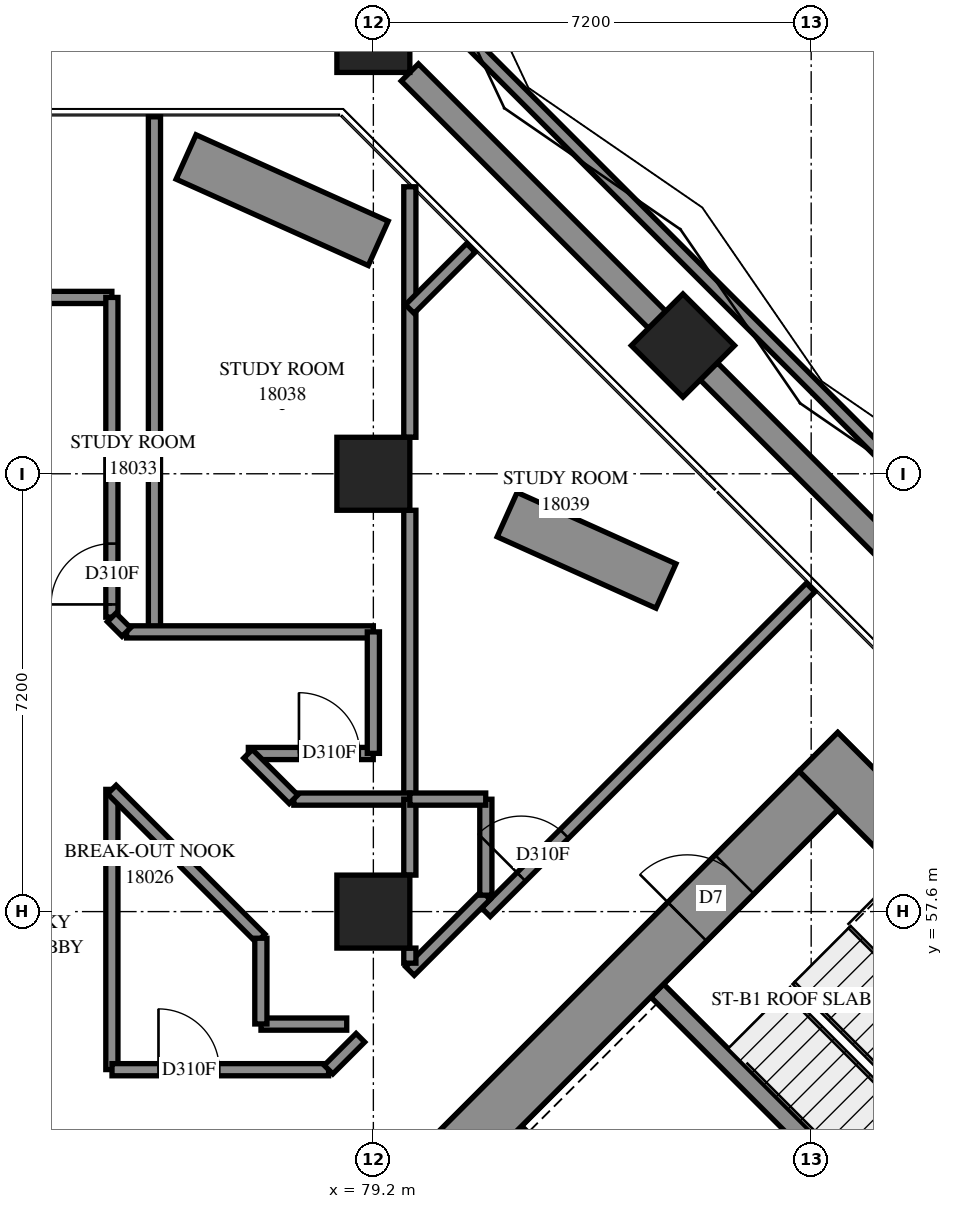
"""IFC4 building model, lengths in metres.
Left out: names, types, materials, properties, quantities, classifications, styles, units other than length and angle.
Written with IfcOpenShell. Run it as: python <this file> out.ifc"""

import sys

from ifc_helpers import new_model, si_unit, direction, frame, frame_2d, origin, origin_2d, place, context, subcontext, project, spatial, polyline, rectangle, outline, extrude, element, fill, save


model = new_model("IFC4")
c1 = context("Model", 3, precision=1e-05, world=origin(), true_north=direction((0.0, 1.0)))
c2 = subcontext(c1, "Body", "Model", "MODEL_VIEW")
j1 = project(units=[si_unit("LENGTHUNIT", "METRE"), si_unit("PLANEANGLEUNIT", "RADIAN")], contexts=[c1])
p1 = place(None, origin())
s1 = spatial("IfcSite", under=j1, at=p1, CompositionType="ELEMENT")
p2 = place(p1, origin())
s2 = spatial("IfcBuilding", under=s1, at=p2, CompositionType="ELEMENT")
p3 = place(p2, frame((0.0, 0.0, 67.8)))
s3 = spatial("IfcBuildingStorey", under=s2, at=p3, CompositionType="ELEMENT", Elevation=67.8)
for number, where, z_axis, x_axis in (
    (1, (79.2, 57.6, 0.0), (0.0, 0.0, 1.0), (1.0, 0.0, 0.0)),
    (2, (79.2, 64.8, 0.0), (0.0, 0.0, 1.0), (1.0, 0.0, 0.0)),
    (3, (79.2, 72.0, 0.0), (0.0, 0.0, 1.0), (1.0, 0.0, 0.0)),
    (4, (84.291, 66.909, 0.0), (0.0, 0.0, 1.0), (0.707, -0.707, 0.0)),
):
    element("IfcColumn", number, at=place(p3, frame(where, z_axis=z_axis, x_axis=x_axis)), inside=s3, PredefinedType="COLUMN", context=c2, shape_type="SweptSolid", body=[
        extrude(rectangle(XDim=1.2, YDim=1.2, at=origin_2d()), origin(), (0.0, 0.0, 1.0), 3.9),
    ])
p4 = place(p3, frame((86.519, 60.227, -0.3), z_axis=(0.0, 0.0, 1.0), x_axis=(0.7071036948, -0.7071098676, 0.0)))
e5 = element("IfcWall", 5, at=p4, inside=s3, PredefinedType="SHEAR", context=c2, shape_type="SweptSolid", body=[
    extrude(rectangle(XDim=16.2, YDim=0.9, at=frame_2d((8.1, 0.0))), origin(), (0.0, 0.0, 1.0), 3.5),
])
p5 = place(p4, frame((10.9, 0.0, 0.3)))
e6 = element("IfcOpeningElement", 6, at=p5, cuts=e5, PredefinedType="OPENING", context=c2, shape_type="SweptSolid", body=[
    extrude(rectangle(XDim=0.8, YDim=2.1, at=frame_2d((0.4, 1.05))), frame((0.0, 0.46, 0.0), z_axis=(0.0, -1.0, 0.0), x_axis=(1.0, 0.0, 0.0)), (0.0, 0.0, 1.0), 0.92),
])
p6 = place(p3, frame((76.336, 49.408, -0.3), z_axis=(0.0, 0.0, 1.0), x_axis=(0.7071067812, 0.7071067812, 0.0)))
e7 = element("IfcWall", 7, at=p6, inside=s3, PredefinedType="SHEAR", context=c2, shape_type="SweptSolid", body=[
    extrude(rectangle(XDim=14.4, YDim=0.9, at=frame_2d((7.2, 0.0))), origin(), (0.0, 0.0, 1.0), 3.5),
])
p7 = place(p6, frame((4.55, 0.0, 0.3)))
e8 = element("IfcOpeningElement", 8, at=p7, cuts=e7, PredefinedType="OPENING", context=c2, shape_type="SweptSolid", body=[
    extrude(rectangle(XDim=1.1, YDim=2.1, at=frame_2d((0.55, 1.05))), frame((0.0, 0.46, 0.0), z_axis=(0.0, -1.0, 0.0), x_axis=(1.0, 0.0, 0.0)), (0.0, 0.0, 1.0), 0.92),
])
p8 = place(p6, frame((11.35, 0.0, 0.3)))
e9 = element("IfcOpeningElement", 9, at=p8, cuts=e7, PredefinedType="OPENING", context=c2, shape_type="SweptSolid", body=[
    extrude(rectangle(XDim=1.1, YDim=2.1, at=frame_2d((0.55, 1.05))), frame((0.0, 0.46, 0.0), z_axis=(0.0, -1.0, 0.0), x_axis=(1.0, 0.0, 0.0)), (0.0, 0.0, 1.0), 0.92),
])
p9 = place(p3, frame((81.534, 53.969, 0.0), z_axis=(0.0, 0.0, 1.0), x_axis=(0.707103309, -0.7071102534, 0.0)))
e10 = element("IfcWall", 10, at=p9, inside=s3, PredefinedType="SOLIDWALL", context=c2, shape_type="SweptSolid", body=[
    extrude(rectangle(XDim=14.4, YDim=0.3, at=frame_2d((7.2, 0.0))), origin(), (0.0, 0.0, 1.0), 3.9),
])
p10 = place(p9, frame((12.05, 0.0, 0.0)))
e11 = element("IfcOpeningElement", 11, at=p10, cuts=e10, PredefinedType="OPENING", context=c2, shape_type="SweptSolid", body=[
    extrude(rectangle(XDim=1.1, YDim=2.1, at=frame_2d((0.55, 1.05))), frame((0.0, 0.16, 0.0), z_axis=(0.0, -1.0, 0.0), x_axis=(1.0, 0.0, 0.0)), (0.0, 0.0, 1.0), 0.32),
])
p11 = place(p3, frame((83.867, 56.302, 0.0), z_axis=(0.0, 0.0, 1.0), x_axis=(0.7071137256, -0.7070998367, 0.0)))
e12 = element("IfcWall", 12, at=p11, inside=s3, PredefinedType="SOLIDWALL", context=c2, shape_type="SweptSolid", body=[
    extrude(rectangle(XDim=7.2, YDim=0.3, at=frame_2d((3.6, 0.0))), origin(), (0.0, 0.0, 1.0), 3.9),
])
p12 = place(p3, frame((79.28, 68.59, 0.0), z_axis=(0.0, 0.0, 1.0), x_axis=(-0.9121050399, 0.4099565785, 0.0)))
e13 = element("IfcWall", 13, at=p12, inside=s3, PredefinedType="SOLIDWALL", context=c2, shape_type="SweptSolid", body=[
    extrude(rectangle(XDim=3.465, YDim=0.8, at=frame_2d((1.732, 0.0))), origin(), (0.0, 0.0, 1.0), 0.65),
])
p13 = place(p3, frame((84.012, 62.954, 0.0), z_axis=(0.0, 0.0, 1.0), x_axis=(-0.9121102307, 0.4099450292, 0.0)))
e14 = element("IfcWall", 14, at=p13, inside=s3, PredefinedType="SOLIDWALL", context=c2, shape_type="SweptSolid", body=[
    extrude(rectangle(XDim=2.864, YDim=0.8, at=frame_2d((1.432, 0.0))), origin(), (0.0, 0.0, 1.0), 0.65),
])
p14 = place(p3, frame((112.929, 39.756, 0.0), z_axis=(0.0, 0.0, 1.0), x_axis=(-0.7071067812, 0.7071067812, 0.0)))
e15 = element("IfcWall", 15, at=p14, inside=s3, PredefinedType="SOLIDWALL", context=c2, shape_type="SweptSolid", body=[
    extrude(outline(polyline([(-0.1, -0.1), (47.126, -0.1), (47.044, 0.1), (0.1, 0.1), (-0.1, -0.1)])), origin(), (0.0, 0.0, 1.0), 4.2),
])
p15 = place(p3, frame((54.7, 67.7, 0.0), z_axis=(0.0, 0.0, 1.0), x_axis=(1.0, 0.0, 0.0)))
e16 = element("IfcWall", 16, at=p15, inside=s3, PredefinedType="PARTITIONING", context=c2, shape_type="SweptSolid", body=[
    extrude(rectangle(XDim=20.2, YDim=0.2, at=frame_2d((10.1, 0.0))), origin(), (0.0, 0.0, 1.0), 3.9),
])
p16 = place(p15, frame((4.992, 0.0, 0.0)))
e17 = element("IfcOpeningElement", 17, at=p16, cuts=e16, PredefinedType="OPENING", context=c2, shape_type="SweptSolid", body=[
    extrude(rectangle(XDim=1.0, YDim=2.1, at=frame_2d((0.5, 1.05))), frame((0.0, 0.11, 0.0), z_axis=(0.0, -1.0, 0.0), x_axis=(1.0, 0.0, 0.0)), (0.0, 0.0, 1.0), 0.22),
])
p17 = place(p15, frame((7.067, 0.0, 0.0)))
e18 = element("IfcOpeningElement", 18, at=p17, cuts=e16, PredefinedType="OPENING", context=c2, shape_type="SweptSolid", body=[
    extrude(rectangle(XDim=1.0, YDim=2.1, at=frame_2d((0.5, 1.05))), frame((0.0, 0.11, 0.0), z_axis=(0.0, -1.0, 0.0), x_axis=(1.0, 0.0, 0.0)), (0.0, 0.0, 1.0), 0.22),
])
p18 = place(p15, frame((12.193, 0.0, 0.0)))
e19 = element("IfcOpeningElement", 19, at=p18, cuts=e16, PredefinedType="OPENING", context=c2, shape_type="SweptSolid", body=[
    extrude(rectangle(XDim=1.0, YDim=2.1, at=frame_2d((0.5, 1.05))), frame((0.0, 0.11, 0.0), z_axis=(0.0, -1.0, 0.0), x_axis=(1.0, 0.0, 0.0)), (0.0, 0.0, 1.0), 0.22),
])
p19 = place(p15, frame((14.268, 0.0, 0.0)))
e20 = element("IfcOpeningElement", 20, at=p19, cuts=e16, PredefinedType="OPENING", context=c2, shape_type="SweptSolid", body=[
    extrude(rectangle(XDim=1.0, YDim=2.1, at=frame_2d((0.5, 1.05))), frame((0.0, 0.11, 0.0), z_axis=(0.0, -1.0, 0.0), x_axis=(1.0, 0.0, 0.0)), (0.0, 0.0, 1.0), 0.22),
])
p20 = place(p3, frame((75.6, 62.2, 0.0), z_axis=(0.0, 0.0, 1.0), x_axis=(0.0, 1.0, 0.0)))
e21 = element("IfcWall", 21, at=p20, inside=s3, PredefinedType="PARTITIONING", context=c2, shape_type="SweptSolid", body=[
    extrude(rectangle(XDim=8.47, YDim=0.2, at=frame_2d((4.235, 0.0))), origin(), (0.0, 0.0, 1.0), 3.9),
])
p21 = place(p3, frame((81.051, 57.589, 0.0), z_axis=(0.0, 0.0, 1.0), x_axis=(0.7071067812, 0.7071067812, 0.0)))
e22 = element("IfcWall", 22, at=p21, inside=s3, PredefinedType="PARTITIONING", context=c2, shape_type="SweptSolid", body=[
    extrude(rectangle(XDim=7.552, YDim=0.2, at=frame_2d((3.776, 0.0))), origin(), (0.0, 0.0, 1.0), 3.9),
])
p22 = place(p21, frame((0.823, 0.0, 0.0)))
e23 = element("IfcOpeningElement", 23, at=p22, cuts=e22, PredefinedType="OPENING", context=c2, shape_type="SweptSolid", body=[
    extrude(rectangle(XDim=1.0, YDim=2.1, at=frame_2d((0.5, 1.05))), frame((0.0, 0.11, 0.0), z_axis=(0.0, -1.0, 0.0), x_axis=(1.0, 0.0, 0.0)), (0.0, 0.0, 1.0), 0.22),
])
p23 = place(p3, frame((74.9, 62.442, 0.0), z_axis=(0.0, 0.0, 1.0), x_axis=(0.0, 1.0, 0.0)))
e24 = element("IfcWall", 24, at=p23, inside=s3, PredefinedType="PARTITIONING", context=c2, shape_type="SweptSolid", body=[
    extrude(rectangle(XDim=5.258, YDim=0.2, at=frame_2d((2.629, 0.0))), origin(), (0.0, 0.0, 1.0), 3.9),
])
p24 = place(p23, frame((0.209, 0.0, 0.0)))
e25 = element("IfcOpeningElement", 25, at=p24, cuts=e24, PredefinedType="OPENING", context=c2, shape_type="SweptSolid", body=[
    extrude(rectangle(XDim=1.0, YDim=2.1, at=frame_2d((0.5, 1.05))), frame((0.0, 0.11, 0.0), z_axis=(0.0, -1.0, 0.0), x_axis=(1.0, 0.0, 0.0)), (0.0, 0.0, 1.0), 0.22),
])
p25 = place(p3, frame((79.8, 59.45, 0.0), z_axis=(0.0, 0.0, 1.0), x_axis=(0.0, 1.0, 0.0)))
e26 = element("IfcWall", 26, at=p25, inside=s3, PredefinedType="PARTITIONING", context=c2, shape_type="SweptSolid", body=[
    extrude(rectangle(XDim=4.75, YDim=0.2, at=frame_2d((2.375, 0.0))), origin(), (0.0, 0.0, 1.0), 3.9),
])
p26 = place(p3, frame((74.9, 55.002, 0.0), z_axis=(0.0, 0.0, 1.0), x_axis=(0.0, 1.0, 0.0)))
e27 = element("IfcWall", 27, at=p26, inside=s3, PredefinedType="PARTITIONING", context=c2, shape_type="SweptSolid", body=[
    extrude(rectangle(XDim=4.608, YDim=0.2, at=frame_2d((2.304, 0.0))), origin(), (0.0, 0.0, 1.0), 3.9),
])
p27 = place(p3, frame((79.8, 65.4, 0.0), z_axis=(0.0, 0.0, 1.0), x_axis=(0.0, 1.0, 0.0)))
e28 = element("IfcWall", 28, at=p27, inside=s3, PredefinedType="PARTITIONING", context=c2, shape_type="SweptSolid", body=[
    extrude(rectangle(XDim=4.12, YDim=0.2, at=frame_2d((2.06, 0.0))), origin(), (0.0, 0.0, 1.0), 3.9),
])
p28 = place(p3, frame((75.142, 62.2, 0.0), z_axis=(0.0, 0.0, 1.0), x_axis=(1.0, 0.0, 0.0)))
e29 = element("IfcWall", 29, at=p28, inside=s3, PredefinedType="PARTITIONING", context=c2, shape_type="SweptSolid", body=[
    extrude(rectangle(XDim=4.058, YDim=0.2, at=frame_2d((2.029, 0.0))), origin(), (0.0, 0.0, 1.0), 3.9),
])
p29 = place(p3, frame((74.902, 55.0, 0.0), z_axis=(0.0, 0.0, 1.0), x_axis=(1.0, 0.0, 0.0)))
e30 = element("IfcWall", 30, at=p29, inside=s3, PredefinedType="PARTITIONING", context=c2, shape_type="SweptSolid", body=[
    extrude(rectangle(XDim=3.562, YDim=0.2, at=frame_2d((1.781, 0.0))), origin(), (0.0, 0.0, 1.0), 3.9),
])
p30 = place(p29, frame((0.764, 0.0, 0.0)))
e31 = element("IfcOpeningElement", 31, at=p30, cuts=e30, PredefinedType="OPENING", context=c2, shape_type="SweptSolid", body=[
    extrude(rectangle(XDim=1.0, YDim=2.1, at=frame_2d((0.5, 1.05))), frame((0.0, 0.11, 0.0), z_axis=(0.0, -1.0, 0.0), x_axis=(1.0, 0.0, 0.0)), (0.0, 0.0, 1.0), 0.22),
])
p31 = place(p3, frame((74.899, 59.607, 0.0), z_axis=(0.0, 0.0, 1.0), x_axis=(0.7071067812, -0.7071067812, 0.0)))
e32 = element("IfcWall", 32, at=p31, inside=s3, PredefinedType="PARTITIONING", context=c2, shape_type="SweptSolid", body=[
    extrude(rectangle(XDim=3.462, YDim=0.2, at=frame_2d((1.731, 0.0))), origin(), (0.0, 0.0, 1.0), 3.9),
])
p32 = place(p3, frame((77.144, 60.2, 0.0), z_axis=(0.0, 0.0, 1.0), x_axis=(1.0, 0.0, 0.0)))
e33 = element("IfcWall", 33, at=p32, inside=s3, PredefinedType="PARTITIONING", context=c2, shape_type="SweptSolid", body=[
    extrude(rectangle(XDim=2.054, YDim=0.2, at=frame_2d((1.027, 0.0))), origin(), (0.0, 0.0, 1.0), 3.9),
])
p33 = place(p32, frame((0.832, 0.0, 0.0)))
e34 = element("IfcOpeningElement", 34, at=p33, cuts=e33, PredefinedType="OPENING", context=c2, shape_type="SweptSolid", body=[
    extrude(rectangle(XDim=1.0, YDim=2.1, at=frame_2d((0.5, 1.05))), frame((0.0, 0.11, 0.0), z_axis=(0.0, -1.0, 0.0), x_axis=(1.0, 0.0, 0.0)), (0.0, 0.0, 1.0), 0.22),
])
p34 = place(p3, frame((79.2, 60.202, 0.0), z_axis=(0.0, 0.0, 1.0), x_axis=(0.0, 1.0, 0.0)))
e35 = element("IfcWall", 35, at=p34, inside=s3, PredefinedType="PARTITIONING", context=c2, shape_type="SweptSolid", body=[
    extrude(rectangle(XDim=1.998, YDim=0.2, at=frame_2d((0.999, 0.0))), origin(), (0.0, 0.0, 1.0), 3.9),
])
p35 = place(p3, frame((77.892, 59.45, 0.0), z_axis=(0.0, 0.0, 1.0), x_axis=(1.0, 0.0, 0.0)))
e36 = element("IfcWall", 36, at=p35, inside=s3, PredefinedType="PARTITIONING", context=c2, shape_type="SweptSolid", body=[
    extrude(rectangle(XDim=1.908, YDim=0.2, at=frame_2d((0.954, 0.0))), origin(), (0.0, 0.0, 1.0), 3.9),
])
p36 = place(p3, frame((79.802, 56.623, 0.0), z_axis=(0.0, 0.0, 1.0), x_axis=(0.7071067812, 0.7071067812, 0.0)))
e37 = element("IfcWall", 37, at=p36, inside=s3, PredefinedType="PARTITIONING", context=c2, shape_type="SweptSolid", body=[
    extrude(rectangle(XDim=1.765, YDim=0.2, at=frame_2d((0.882, 0.0))), origin(), (0.0, 0.0, 1.0), 3.9),
])
p37 = place(p3, frame((81.05, 57.87, 0.0), z_axis=(0.0, 0.0, 1.0), x_axis=(0.0, 1.0, 0.0)))
e38 = element("IfcWall", 38, at=p37, inside=s3, PredefinedType="PARTITIONING", context=c2, shape_type="SweptSolid", body=[
    extrude(rectangle(XDim=1.578, YDim=0.2, at=frame_2d((0.789, 0.0))), origin(), (0.0, 0.0, 1.0), 3.9),
])
p38 = place(p3, frame((79.799, 67.509, 0.0), z_axis=(0.0, 0.0, 1.0), x_axis=(0.7071067812, 0.7071067812, 0.0)))
e39 = element("IfcWall", 39, at=p38, inside=s3, PredefinedType="PARTITIONING", context=c2, shape_type="SweptSolid", body=[
    extrude(rectangle(XDim=1.423, YDim=0.2, at=frame_2d((0.711, 0.0))), origin(), (0.0, 0.0, 1.0), 3.9),
])
for number, where, z_axis, x_axis in (
    (40, (77.352, 55.75, 0.0), (0.0, 0.0, 1.0), (1.0, 0.0, 0.0)),
    (41, (77.35, 55.752, 0.0), (0.0, 0.0, 1.0), (0.0, 1.0, 0.0)),
):
    element("IfcWall", number, at=place(p3, frame(where, z_axis=z_axis, x_axis=x_axis)), inside=s3, PredefinedType="PARTITIONING", context=c2, shape_type="SweptSolid", body=[
        extrude(rectangle(XDim=1.41, YDim=0.2, at=frame_2d((0.705, 0.0))), origin(), (0.0, 0.0, 1.0), 3.9),
    ])
p39 = place(p3, frame((79.8, 58.2, 0.0), z_axis=(0.0, 0.0, 1.0), x_axis=(0.0, 1.0, 0.0)))
e42 = element("IfcWall", 42, at=p39, inside=s3, PredefinedType="PARTITIONING", context=c2, shape_type="SweptSolid", body=[
    extrude(rectangle(XDim=1.25, YDim=0.2, at=frame_2d((0.625, 0.0))), origin(), (0.0, 0.0, 1.0), 3.9),
])
p40 = place(p3, frame((79.8, 59.45, 0.0), z_axis=(0.0, 0.0, 1.0), x_axis=(1.0, 0.0, 0.0)))
e43 = element("IfcWall", 43, at=p40, inside=s3, PredefinedType="PARTITIONING", context=c2, shape_type="SweptSolid", body=[
    extrude(rectangle(XDim=1.248, YDim=0.2, at=frame_2d((0.624, 0.0))), origin(), (0.0, 0.0, 1.0), 3.9),
])
p41 = place(p3, frame((77.139, 60.195, 0.0), z_axis=(0.0, 0.0, 1.0), x_axis=(0.7071067812, -0.7071067812, 0.0)))
e44 = element("IfcWall", 44, at=p41, inside=s3, PredefinedType="PARTITIONING", context=c2, shape_type="SweptSolid", body=[
    extrude(rectangle(XDim=1.058, YDim=0.2, at=frame_2d((0.529, 0.0))), origin(), (0.0, 0.0, 1.0), 3.9),
])
p42 = place(p3, frame((78.463, 55.001, 0.0), z_axis=(0.0, 0.0, 1.0), x_axis=(0.7071067812, 0.7071067812, 0.0)))
e45 = element("IfcWall", 45, at=p42, inside=s3, PredefinedType="PARTITIONING", context=c2, shape_type="SweptSolid", body=[
    extrude(rectangle(XDim=0.741, YDim=0.2, at=frame_2d((0.37, 0.0))), origin(), (0.0, 0.0, 1.0), 3.9),
])
p43 = place(p3, frame((79.8, 56.752, 0.0), z_axis=(0.0, 0.0, 1.0), x_axis=(0.0, 1.0, 0.0)))
e46 = element("IfcWall", 46, at=p43, inside=s3, PredefinedType="PARTITIONING", context=c2, shape_type="SweptSolid", body=[
    extrude(rectangle(XDim=0.248, YDim=0.2, at=frame_2d((0.124, 0.0))), origin(), (0.0, 0.0, 1.0), 3.9),
])
p44 = place(p3, frame((74.897, 62.437, 0.0), z_axis=(0.0, 0.0, 1.0), x_axis=(0.7071067812, -0.7071067812, 0.0)))
e47 = element("IfcWall", 47, at=p44, inside=s3, PredefinedType="PARTITIONING", context=c2, shape_type="SweptSolid", body=[
    extrude(rectangle(XDim=0.339, YDim=0.2, at=frame_2d((0.17, 0.0))), origin(), (0.0, 0.0, 1.0), 3.9),
])
p45 = place(p8, origin())
e48 = element("IfcDoor", 48, at=p45, inside=s3, OperationType="SINGLE_SWING_LEFT", PredefinedType="DOOR", context=c2, shape_type="SweptSolid", body=[
    extrude(rectangle(XDim=1.1, YDim=2.1, at=frame_2d((0.55, 1.05))), frame((0.0, 0.025, 0.0), z_axis=(0.0, -1.0, 0.0), x_axis=(1.0, 0.0, 0.0)), (0.0, 0.0, 1.0), 0.05),
])
fill(e9, e48)
p46 = place(p30, origin())
e49 = element("IfcDoor", 49, at=p46, inside=s3, OperationType="SINGLE_SWING_LEFT", PredefinedType="DOOR", context=c2, shape_type="SweptSolid", body=[
    extrude(rectangle(XDim=1.0, YDim=2.1, at=frame_2d((0.5, 1.05))), frame((0.0, 0.025, 0.0), z_axis=(0.0, -1.0, 0.0), x_axis=(1.0, 0.0, 0.0)), (0.0, 0.0, 1.0), 0.05),
])
fill(e31, e49)
p47 = place(p24, origin())
e50 = element("IfcDoor", 50, at=p47, inside=s3, OperationType="SINGLE_SWING_RIGHT", PredefinedType="DOOR", context=c2, shape_type="SweptSolid", body=[
    extrude(rectangle(XDim=1.0, YDim=2.1, at=frame_2d((0.5, 1.05))), frame((0.0, 0.025, 0.0), z_axis=(0.0, -1.0, 0.0), x_axis=(1.0, 0.0, 0.0)), (0.0, 0.0, 1.0), 0.05),
])
fill(e25, e50)
p48 = place(p33, origin())
e51 = element("IfcDoor", 51, at=p48, inside=s3, OperationType="SINGLE_SWING_LEFT", PredefinedType="DOOR", context=c2, shape_type="SweptSolid", body=[
    extrude(rectangle(XDim=1.0, YDim=2.1, at=frame_2d((0.5, 1.05))), frame((0.0, 0.025, 0.0), z_axis=(0.0, -1.0, 0.0), x_axis=(1.0, 0.0, 0.0)), (0.0, 0.0, 1.0), 0.05),
])
fill(e34, e51)
p49 = place(p22, origin())
e52 = element("IfcDoor", 52, at=p49, inside=s3, OperationType="SINGLE_SWING_RIGHT", PredefinedType="DOOR", context=c2, shape_type="SweptSolid", body=[
    extrude(rectangle(XDim=1.0, YDim=2.1, at=frame_2d((0.5, 1.05))), frame((0.0, 0.025, 0.0), z_axis=(0.0, -1.0, 0.0), x_axis=(1.0, 0.0, 0.0)), (0.0, 0.0, 1.0), 0.05),
])
fill(e23, e52)
save(model, sys.argv[1])
